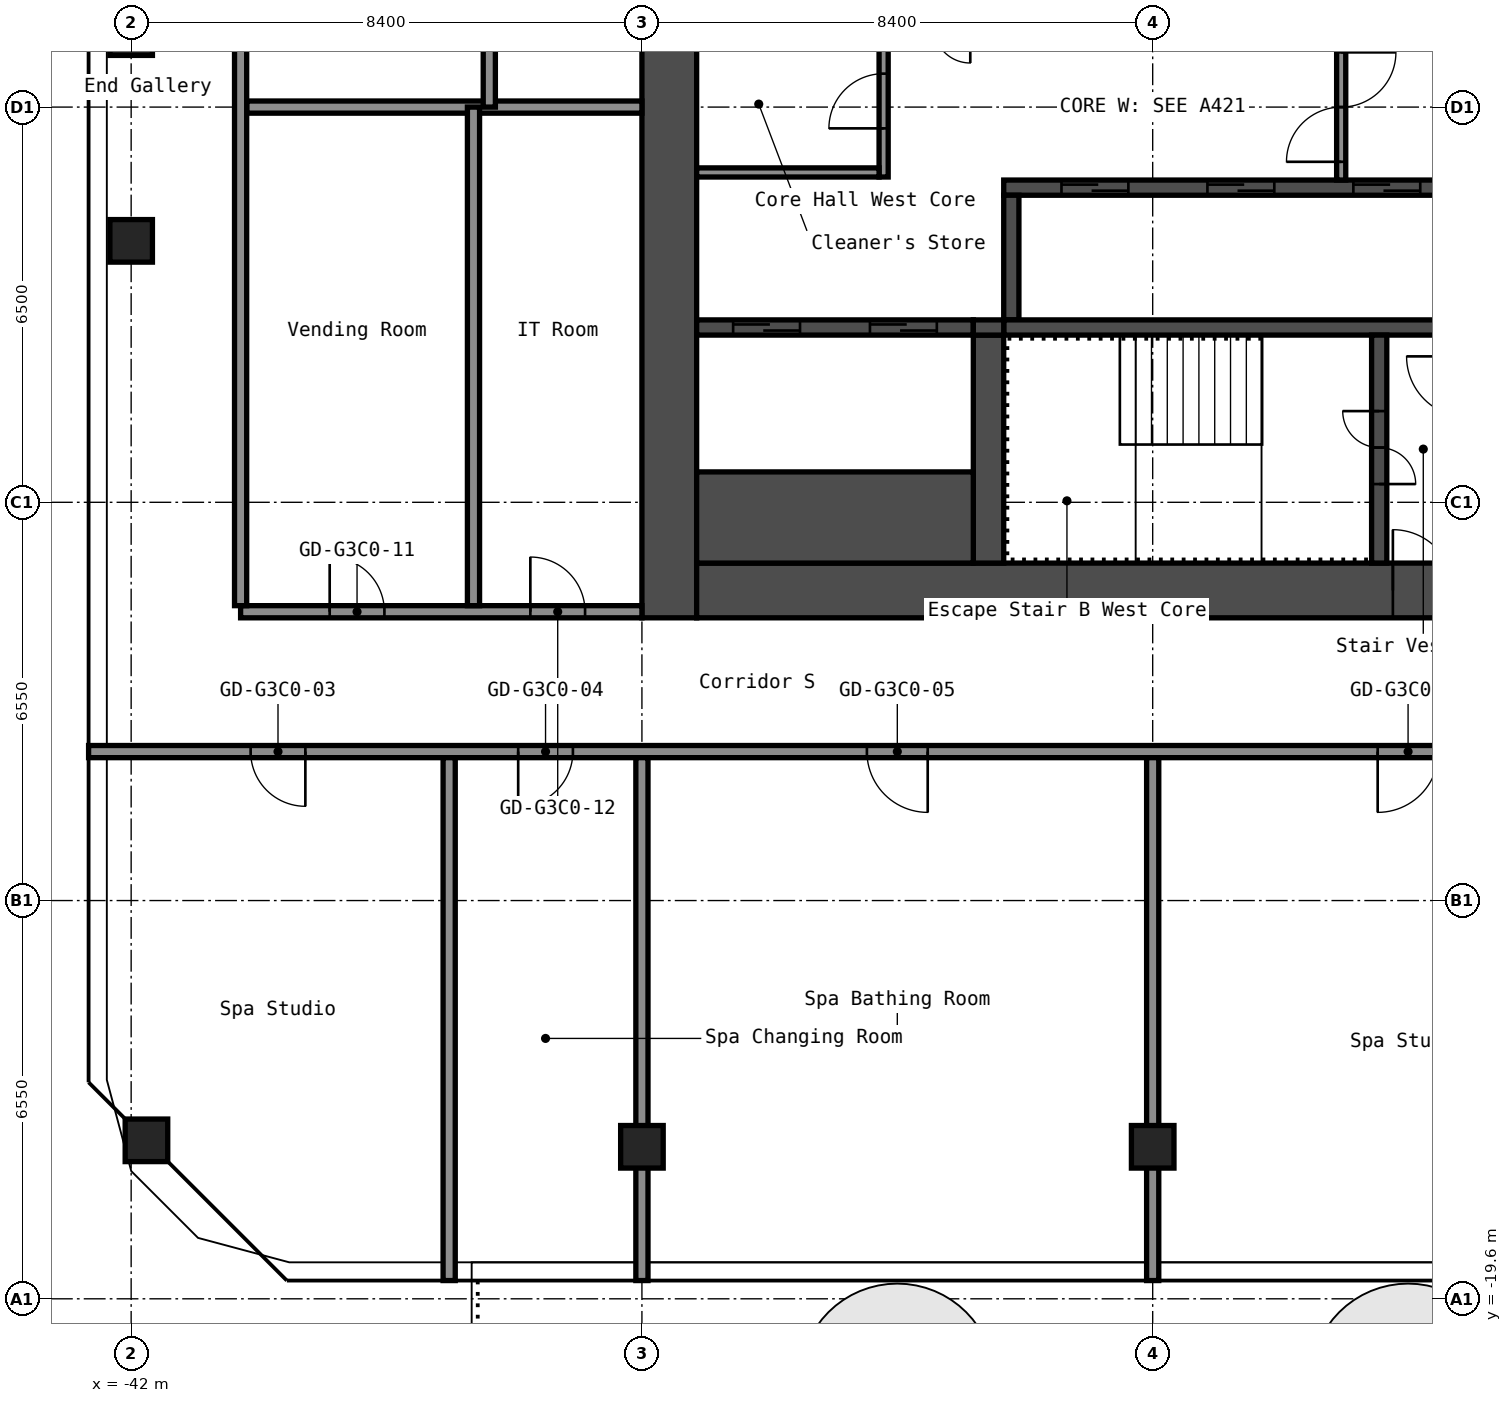
"""IFC4 building model, lengths in metres.
Left out: names, types, materials, properties, quantities, classifications, styles, units other than length and angle.
Written with IfcOpenShell. Run it as: python <this file> out.ifc"""

import sys

from ifc_helpers import new_model, si_unit, direction, frame, frame_2d, origin, origin_2d, place, context, subcontext, project, spatial, rectangle, hollow_rectangle, extrude, element, fill, save


model = new_model("IFC4")
c1 = context("Model", 3, precision=1e-05, world=origin(), true_north=direction((0.0, 1.0)))
c2 = subcontext(c1, "Body", "Model", "MODEL_VIEW")
j1 = project(units=[si_unit("LENGTHUNIT", "METRE"), si_unit("PLANEANGLEUNIT", "RADIAN")], contexts=[c1])
p1 = place(None, origin())
s1 = spatial("IfcSite", under=j1, at=p1, CompositionType="ELEMENT")
p2 = place(p1, origin())
s2 = spatial("IfcBuilding", under=s1, at=p2, CompositionType="ELEMENT")
p3 = place(p2, frame((0.0, 0.0, 137.4)))
s3 = spatial("IfcBuildingStorey", under=s2, at=p3, CompositionType="ELEMENT", Elevation=137.4)
for number, where, z_axis, x_axis in (
    (1, (-41.749, -16.994, 0.0), (0.0, 0.0, 1.0), (1.0, 0.0, 0.0)),
    (2, (-42.0, -2.2, 0.0), (0.0, 0.0, 1.0), (1.0, 0.0, 0.0)),
    (3, (-42.0, 1.2, 0.0), (0.0, 0.0, 1.0), (1.0, 0.0, 0.0)),
    (4, (-33.6, -17.1, 0.0), (0.0, 0.0, 1.0), (1.0, 0.0, 0.0)),
    (5, (-25.2, -17.1, 0.0), (0.0, 0.0, 1.0), (1.0, 0.0, 0.0)),
):
    element("IfcColumn", number, at=place(p3, frame(where, z_axis=z_axis, x_axis=x_axis)), inside=s3, PredefinedType="COLUMN", context=c2, shape_type="SweptSolid", body=[
        extrude(hollow_rectangle(XDim=0.7, YDim=0.7, WallThickness=0.028, at=origin_2d()), origin(), (0.0, 0.0, 1.0), 2.75),
    ])
p4 = place(p3, frame((-33.15, -8.4, 0.0), z_axis=(0.0, 0.0, 1.0), x_axis=(0.0, 1.0, 0.0)))
e6 = element("IfcWall", 6, at=p4, inside=s3, PredefinedType="SHEAR", context=c2, shape_type="SweptSolid", body=[
    extrude(rectangle(XDim=16.8, YDim=0.9, at=frame_2d((8.4, 0.0))), origin(), (0.0, 0.0, 1.0), 2.75),
])
p5 = place(p3, frame((-32.7, -7.95, 0.0), z_axis=(0.0, 0.0, 1.0), x_axis=(1.0, 0.0, 0.0)))
e7 = element("IfcWall", 7, at=p5, inside=s3, PredefinedType="SHEAR", context=c2, shape_type="SweptSolid", body=[
    extrude(rectangle(XDim=15.0, YDim=0.9, at=frame_2d((7.5, 0.0))), origin(), (0.0, 0.0, 1.0), 2.75),
])
p6 = place(p5, frame((11.45, 0.0, 0.0)))
e8 = element("IfcOpeningElement", 8, at=p6, cuts=e7, PredefinedType="OPENING", context=c2, shape_type="SweptSolid", body=[
    extrude(rectangle(XDim=1.0, YDim=2.1, at=frame_2d((0.5, 1.05))), frame((0.0, 0.46, 0.0), z_axis=(0.0, -1.0, 0.0), x_axis=(1.0, 0.0, 0.0)), (0.0, 0.0, 1.0), 0.92),
])
p7 = place(p3, frame((-27.65, -1.325, 0.0), z_axis=(0.0, 0.0, 1.0), x_axis=(1.0, 0.0, 0.0)))
e9 = element("IfcWall", 9, at=p7, inside=s3, PredefinedType="SHEAR", context=c2, shape_type="SweptSolid", body=[
    extrude(rectangle(XDim=7.5, YDim=0.25, at=frame_2d((3.75, 0.0))), origin(), (0.0, 0.0, 1.0), 2.75),
])
p8 = place(p7, frame((5.75, 0.0, 0.0)))
e10 = element("IfcOpeningElement", 10, at=p8, cuts=e9, PredefinedType="OPENING", context=c2, shape_type="SweptSolid", body=[
    extrude(rectangle(XDim=1.1, YDim=2.1, at=frame_2d((0.55, 1.05))), frame((0.0, 0.135, 0.0), z_axis=(0.0, -1.0, 0.0), x_axis=(1.0, 0.0, 0.0)), (0.0, 0.0, 1.0), 0.27),
])
p9 = place(p7, frame((3.35, 0.0, 0.0)))
e11 = element("IfcOpeningElement", 11, at=p9, cuts=e9, PredefinedType="OPENING", context=c2, shape_type="SweptSolid", body=[
    extrude(rectangle(XDim=1.1, YDim=2.1, at=frame_2d((0.55, 1.05))), frame((0.0, 0.135, 0.0), z_axis=(0.0, -1.0, 0.0), x_axis=(1.0, 0.0, 0.0)), (0.0, 0.0, 1.0), 0.27),
])
p10 = place(p7, frame((0.95, 0.0, 0.0)))
e12 = element("IfcOpeningElement", 12, at=p10, cuts=e9, PredefinedType="OPENING", context=c2, shape_type="SweptSolid", body=[
    extrude(rectangle(XDim=1.1, YDim=2.1, at=frame_2d((0.55, 1.05))), frame((0.0, 0.135, 0.0), z_axis=(0.0, -1.0, 0.0), x_axis=(1.0, 0.0, 0.0)), (0.0, 0.0, 1.0), 0.27),
])
p11 = place(p3, frame((-27.525, -3.5, 0.0), z_axis=(0.0, 0.0, 1.0), x_axis=(0.0, 1.0, 0.0)))
e13 = element("IfcWall", 13, at=p11, inside=s3, PredefinedType="SHEAR", context=c2, shape_type="SweptSolid", body=[
    extrude(rectangle(XDim=2.05, YDim=0.25, at=frame_2d((1.025, 0.0))), origin(), (0.0, 0.0, 1.0), 2.75),
])
p12 = place(p3, frame((-27.65, -3.625, 0.0), z_axis=(0.0, 0.0, 1.0), x_axis=(1.0, 0.0, 0.0)))
e14 = element("IfcWall", 14, at=p12, inside=s3, PredefinedType="SHEAR", context=c2, shape_type="SweptSolid", body=[
    extrude(rectangle(XDim=7.5, YDim=0.25, at=frame_2d((3.75, 0.0))), origin(), (0.0, 0.0, 1.0), 2.75),
])
p13 = place(p3, frame((-21.475, -7.5, 0.0), z_axis=(0.0, 0.0, 1.0), x_axis=(0.0, 1.0, 0.0)))
e15 = element("IfcWall", 15, at=p13, inside=s3, PredefinedType="SHEAR", context=c2, shape_type="SweptSolid", body=[
    extrude(rectangle(XDim=3.75, YDim=0.25, at=frame_2d((1.875, 0.0))), origin(), (0.0, 0.0, 1.0), 2.75),
])
p14 = place(p13, frame((1.3, 0.0, 0.0)))
e16 = element("IfcOpeningElement", 16, at=p14, cuts=e15, PredefinedType="OPENING", context=c2, shape_type="SweptSolid", body=[
    extrude(rectangle(XDim=1.2, YDim=2.1, at=frame_2d((0.6, 1.05))), frame((0.0, 0.135, 0.0), z_axis=(0.0, -1.0, 0.0), x_axis=(1.0, 0.0, 0.0)), (0.0, 0.0, 1.0), 0.27),
])
p15 = place(p3, frame((-27.9, -7.5, 0.0), z_axis=(0.0, 0.0, 1.0), x_axis=(0.0, 1.0, 0.0)))
e17 = element("IfcWall", 17, at=p15, inside=s3, PredefinedType="SHEAR", context=c2, shape_type="SweptSolid", body=[
    extrude(rectangle(XDim=3.75, YDim=0.5, at=frame_2d((1.875, 0.0))), origin(), (0.0, 0.0, 1.0), 2.75),
])
p16 = place(p3, frame((-32.7, -3.625, 0.0), z_axis=(0.0, 0.0, 1.0), x_axis=(1.0, 0.0, 0.0)))
e18 = element("IfcWall", 18, at=p16, inside=s3, PredefinedType="SHEAR", context=c2, shape_type="SweptSolid", body=[
    extrude(rectangle(XDim=4.55, YDim=0.25, at=frame_2d((2.275, 0.0))), origin(), (0.0, 0.0, 1.0), 2.75),
])
p17 = place(p16, frame((2.85, 0.0, 0.0)))
e19 = element("IfcOpeningElement", 19, at=p17, cuts=e18, PredefinedType="OPENING", context=c2, shape_type="SweptSolid", body=[
    extrude(rectangle(XDim=1.1, YDim=2.1, at=frame_2d((0.55, 1.05))), frame((0.0, 0.135, 0.0), z_axis=(0.0, -1.0, 0.0), x_axis=(1.0, 0.0, 0.0)), (0.0, 0.0, 1.0), 0.27),
])
p18 = place(p16, frame((0.6, 0.0, 0.0)))
e20 = element("IfcOpeningElement", 20, at=p18, cuts=e18, PredefinedType="OPENING", context=c2, shape_type="SweptSolid", body=[
    extrude(rectangle(XDim=1.1, YDim=2.1, at=frame_2d((0.55, 1.05))), frame((0.0, 0.135, 0.0), z_axis=(0.0, -1.0, 0.0), x_axis=(1.0, 0.0, 0.0)), (0.0, 0.0, 1.0), 0.27),
])
p19 = place(p3, frame((-32.7, -6.75, 0.0), z_axis=(0.0, 0.0, 1.0), x_axis=(1.0, 0.0, 0.0)))
e21 = element("IfcWall", 21, at=p19, inside=s3, PredefinedType="SHEAR", context=c2, shape_type="SweptSolid", body=[
    extrude(rectangle(XDim=4.55, YDim=1.5, at=frame_2d((2.275, 0.0))), origin(), (0.0, 0.0, 1.0), 2.75),
])
p20 = place(p3, frame((-28.15, -3.625, 0.0), z_axis=(0.0, 0.0, 1.0), x_axis=(1.0, 0.0, 0.0)))
e22 = element("IfcWall", 22, at=p20, inside=s3, PredefinedType="SHEAR", context=c2, shape_type="SweptSolid", body=[
    extrude(rectangle(XDim=0.5, YDim=0.25, at=frame_2d((0.25, 0.0))), origin(), (0.0, 0.0, 1.0), 2.75),
])
p21 = place(p3, frame((-22.1, -1.2, 0.0), z_axis=(0.0, 0.0, 1.0), x_axis=(0.0, 1.0, 0.0)))
e23 = element("IfcWall", 23, at=p21, inside=s3, PredefinedType="PARTITIONING", context=c2, shape_type="SweptSolid", body=[
    extrude(rectangle(XDim=2.4, YDim=0.15, at=frame_2d((1.2, 0.0))), origin(), (0.0, 0.0, 1.0), 2.75),
])
p22 = place(p21, frame((0.3, 0.0, 0.0)))
e24 = element("IfcOpeningElement", 24, at=p22, cuts=e23, PredefinedType="OPENING", context=c2, shape_type="SweptSolid", body=[
    extrude(rectangle(XDim=1.8, YDim=2.1, at=frame_2d((0.9, 1.05))), frame((0.0, 0.085, 0.0), z_axis=(0.0, -1.0, 0.0), x_axis=(1.0, 0.0, 0.0)), (0.0, 0.0, 1.0), 0.17),
])
p23 = place(p3, frame((-29.625, -1.15, 0.0), z_axis=(0.0, 0.0, 1.0), x_axis=(0.0, 1.0, 0.0)))
e25 = element("IfcWall", 25, at=p23, inside=s3, PredefinedType="PARTITIONING", context=c2, shape_type="SweptSolid", body=[
    extrude(rectangle(XDim=2.35, YDim=0.15, at=frame_2d((1.175, 0.0))), origin(), (0.0, 0.0, 1.0), 2.75),
])
p24 = place(p23, frame((0.8, 0.0, 0.0)))
e26 = element("IfcOpeningElement", 26, at=p24, cuts=e25, PredefinedType="OPENING", context=c2, shape_type="SweptSolid", body=[
    extrude(rectangle(XDim=0.9, YDim=2.1, at=frame_2d((0.45, 1.05))), frame((0.0, 0.085, 0.0), z_axis=(0.0, -1.0, 0.0), x_axis=(1.0, 0.0, 0.0)), (0.0, 0.0, 1.0), 0.17),
])
p25 = place(p3, frame((-32.7, -1.075, 0.0), z_axis=(0.0, 0.0, 1.0), x_axis=(1.0, 0.0, 0.0)))
e27 = element("IfcWall", 27, at=p25, inside=s3, PredefinedType="PARTITIONING", context=c2, shape_type="SweptSolid", body=[
    extrude(rectangle(XDim=3.0, YDim=0.15, at=frame_2d((1.5, 0.0))), origin(), (0.0, 0.0, 1.0), 2.75),
])
p26 = place(p3, frame((-42.7, -10.6, 0.0), z_axis=(0.0, 0.0, 1.0), x_axis=(1.0, 0.0, 0.0)))
e28 = element("IfcWall", 28, at=p26, inside=s3, PredefinedType="PARTITIONING", context=c2, shape_type="SweptSolid", body=[
    extrude(rectangle(XDim=25.9, YDim=0.2, at=frame_2d((12.95, 0.0))), origin(), (0.0, 0.0, 1.0), 2.75),
])
p27 = place(p26, frame((2.665, 0.0, 0.0)))
e29 = element("IfcOpeningElement", 29, at=p27, cuts=e28, PredefinedType="OPENING", context=c2, shape_type="SweptSolid", body=[
    extrude(rectangle(XDim=0.9, YDim=2.1, at=frame_2d((0.45, 1.05))), frame((0.0, 0.11, 0.0), z_axis=(0.0, -1.0, 0.0), x_axis=(1.0, 0.0, 0.0)), (0.0, 0.0, 1.0), 0.22),
])
p28 = place(p26, frame((7.065, 0.0, 0.0)))
e30 = element("IfcOpeningElement", 30, at=p28, cuts=e28, PredefinedType="OPENING", context=c2, shape_type="SweptSolid", body=[
    extrude(rectangle(XDim=0.9, YDim=2.1, at=frame_2d((0.45, 1.05))), frame((0.0, 0.11, 0.0), z_axis=(0.0, -1.0, 0.0), x_axis=(1.0, 0.0, 0.0)), (0.0, 0.0, 1.0), 0.22),
])
p29 = place(p26, frame((12.8, 0.0, 0.0)))
e31 = element("IfcOpeningElement", 31, at=p29, cuts=e28, PredefinedType="OPENING", context=c2, shape_type="SweptSolid", body=[
    extrude(rectangle(XDim=1.0, YDim=2.1, at=frame_2d((0.5, 1.05))), frame((0.0, 0.11, 0.0), z_axis=(0.0, -1.0, 0.0), x_axis=(1.0, 0.0, 0.0)), (0.0, 0.0, 1.0), 0.22),
])
p30 = place(p26, frame((21.2, 0.0, 0.0)))
e32 = element("IfcOpeningElement", 32, at=p30, cuts=e28, PredefinedType="OPENING", context=c2, shape_type="SweptSolid", body=[
    extrude(rectangle(XDim=1.0, YDim=2.1, at=frame_2d((0.5, 1.05))), frame((0.0, 0.11, 0.0), z_axis=(0.0, -1.0, 0.0), x_axis=(1.0, 0.0, 0.0)), (0.0, 0.0, 1.0), 0.22),
])
p31 = place(p3, frame((-40.2, -8.3, 0.0), z_axis=(0.0, 0.0, 1.0), x_axis=(1.0, 0.0, 0.0)))
e33 = element("IfcWall", 33, at=p31, inside=s3, PredefinedType="PARTITIONING", context=c2, shape_type="SweptSolid", body=[
    extrude(rectangle(XDim=6.6, YDim=0.2, at=frame_2d((3.3, 0.0))), origin(), (0.0, 0.0, 1.0), 2.75),
])
p32 = place(p31, frame((1.465, 0.0, 0.0)))
e34 = element("IfcOpeningElement", 34, at=p32, cuts=e33, PredefinedType="OPENING", context=c2, shape_type="SweptSolid", body=[
    extrude(rectangle(XDim=0.9, YDim=2.1, at=frame_2d((0.45, 1.05))), frame((0.0, 0.11, 0.0), z_axis=(0.0, -1.0, 0.0), x_axis=(1.0, 0.0, 0.0)), (0.0, 0.0, 1.0), 0.22),
])
p33 = place(p31, frame((4.765, 0.0, 0.0)))
e35 = element("IfcOpeningElement", 35, at=p33, cuts=e33, PredefinedType="OPENING", context=c2, shape_type="SweptSolid", body=[
    extrude(rectangle(XDim=0.9, YDim=2.1, at=frame_2d((0.45, 1.05))), frame((0.0, 0.11, 0.0), z_axis=(0.0, -1.0, 0.0), x_axis=(1.0, 0.0, 0.0)), (0.0, 0.0, 1.0), 0.22),
])
p34 = place(p3, frame((-40.1, 0.0, 0.0), z_axis=(0.0, 0.0, 1.0), x_axis=(1.0, 0.0, 0.0)))
e36 = element("IfcWall", 36, at=p34, inside=s3, PredefinedType="PARTITIONING", context=c2, shape_type="SweptSolid", body=[
    extrude(rectangle(XDim=6.5, YDim=0.2, at=frame_2d((3.25, 0.0))), origin(), (0.0, 0.0, 1.0), 2.75),
])
p35 = place(p3, frame((-40.2, -8.2, 0.0), z_axis=(0.0, 0.0, 1.0), x_axis=(0.0, 1.0, 0.0)))
e37 = element("IfcWall", 37, at=p35, inside=s3, PredefinedType="PARTITIONING", context=c2, shape_type="SweptSolid", body=[
    extrude(rectangle(XDim=16.4, YDim=0.2, at=frame_2d((8.2, 0.0))), origin(), (0.0, 0.0, 1.0), 2.75),
])
p36 = place(p3, frame((-36.77, -19.3, 0.0), z_axis=(0.0, 0.0, 1.0), x_axis=(0.0, 1.0, 0.0)))
e38 = element("IfcWall", 38, at=p36, inside=s3, PredefinedType="PARTITIONING", context=c2, shape_type="SweptSolid", body=[
    extrude(rectangle(XDim=8.6, YDim=0.2, at=frame_2d((4.3, 0.0))), origin(), (0.0, 0.0, 1.0), 2.75),
])
for number, where, z_axis, x_axis in (
    (39, (-36.37, -8.2, 0.0), (0.0, 0.0, 1.0), (0.0, 1.0, 0.0)),
    (40, (-36.11, 0.0, 0.0), (0.0, 0.0, 1.0), (0.0, 1.0, 0.0)),
):
    element("IfcWall", number, at=place(p3, frame(where, z_axis=z_axis, x_axis=x_axis)), inside=s3, PredefinedType="PARTITIONING", context=c2, shape_type="SweptSolid", body=[
        extrude(rectangle(XDim=8.2, YDim=0.2, at=frame_2d((4.1, 0.0))), origin(), (0.0, 0.0, 1.0), 2.75),
    ])
for number, where, z_axis, x_axis in (
    (41, (-33.6, -19.3, 0.0), (0.0, 0.0, 1.0), (0.0, 1.0, 0.0)),
    (42, (-25.2, -19.3, 0.0), (0.0, 0.0, 1.0), (0.0, 1.0, 0.0)),
):
    element("IfcWall", number, at=place(p3, frame(where, z_axis=z_axis, x_axis=x_axis)), inside=s3, PredefinedType="PARTITIONING", context=c2, shape_type="SweptSolid", body=[
        extrude(rectangle(XDim=8.6, YDim=0.2, at=frame_2d((4.3, 0.0))), origin(), (0.0, 0.0, 1.0), 2.75),
    ])
p37 = place(p6, origin())
e43 = element("IfcDoor", 43, at=p37, inside=s3, OperationType="SINGLE_SWING_RIGHT", PredefinedType="DOOR", context=c2, shape_type="SweptSolid", body=[
    extrude(rectangle(XDim=1.0, YDim=2.1, at=frame_2d((0.5, 1.05))), frame((0.0, 0.025, 0.0), z_axis=(0.0, -1.0, 0.0), x_axis=(1.0, 0.0, 0.0)), (0.0, 0.0, 1.0), 0.05),
])
fill(e8, e43)
p38 = place(p14, origin())
e44 = element("IfcDoor", 44, at=p38, inside=s3, OperationType="DOUBLE_DOOR_SINGLE_SWING", PredefinedType="DOOR", context=c2, shape_type="SweptSolid", body=[
    extrude(rectangle(XDim=1.2, YDim=2.1, at=frame_2d((0.6, 1.05))), frame((0.0, 0.025, 0.0), z_axis=(0.0, -1.0, 0.0), x_axis=(1.0, 0.0, 0.0)), (0.0, 0.0, 1.0), 0.05),
])
fill(e16, e44)
p39 = place(p22, origin())
e45 = element("IfcDoor", 45, at=p39, inside=s3, OperationType="DOUBLE_DOOR_SINGLE_SWING", PredefinedType="DOOR", context=c2, shape_type="SweptSolid", body=[
    extrude(rectangle(XDim=1.8, YDim=2.1, at=frame_2d((0.9, 1.05))), frame((0.0, 0.025, 0.0), z_axis=(0.0, -1.0, 0.0), x_axis=(1.0, 0.0, 0.0)), (0.0, 0.0, 1.0), 0.05),
])
fill(e24, e45)
p40 = place(p24, origin())
e46 = element("IfcDoor", 46, at=p40, inside=s3, OperationType="SINGLE_SWING_RIGHT", PredefinedType="DOOR", context=c2, shape_type="SweptSolid", body=[
    extrude(rectangle(XDim=0.9, YDim=2.1, at=frame_2d((0.45, 1.05))), frame((0.0, 0.025, 0.0), z_axis=(0.0, -1.0, 0.0), x_axis=(1.0, 0.0, 0.0)), (0.0, 0.0, 1.0), 0.05),
])
fill(e26, e46)
p41 = place(p8, origin())
e47 = element("IfcDoor", 47, at=p41, inside=s3, OperationType="DOUBLE_DOOR_SLIDING", PredefinedType="DOOR", context=c2, shape_type="SweptSolid", body=[
    extrude(rectangle(XDim=1.1, YDim=2.1, at=frame_2d((0.55, 1.05))), frame((0.0, 0.025, 0.0), z_axis=(0.0, -1.0, 0.0), x_axis=(1.0, 0.0, 0.0)), (0.0, 0.0, 1.0), 0.05),
])
fill(e10, e47)
p42 = place(p9, origin())
e48 = element("IfcDoor", 48, at=p42, inside=s3, OperationType="DOUBLE_DOOR_SLIDING", PredefinedType="DOOR", context=c2, shape_type="SweptSolid", body=[
    extrude(rectangle(XDim=1.1, YDim=2.1, at=frame_2d((0.55, 1.05))), frame((0.0, 0.025, 0.0), z_axis=(0.0, -1.0, 0.0), x_axis=(1.0, 0.0, 0.0)), (0.0, 0.0, 1.0), 0.05),
])
fill(e11, e48)
p43 = place(p10, origin())
e49 = element("IfcDoor", 49, at=p43, inside=s3, OperationType="DOUBLE_DOOR_SLIDING", PredefinedType="DOOR", context=c2, shape_type="SweptSolid", body=[
    extrude(rectangle(XDim=1.1, YDim=2.1, at=frame_2d((0.55, 1.05))), frame((0.0, 0.025, 0.0), z_axis=(0.0, -1.0, 0.0), x_axis=(1.0, 0.0, 0.0)), (0.0, 0.0, 1.0), 0.05),
])
fill(e12, e49)
p44 = place(p17, origin())
e50 = element("IfcDoor", 50, at=p44, inside=s3, OperationType="DOUBLE_DOOR_SLIDING", PredefinedType="DOOR", context=c2, shape_type="SweptSolid", body=[
    extrude(rectangle(XDim=1.1, YDim=2.1, at=frame_2d((0.55, 1.05))), frame((0.0, 0.025, 0.0), z_axis=(0.0, -1.0, 0.0), x_axis=(1.0, 0.0, 0.0)), (0.0, 0.0, 1.0), 0.05),
])
fill(e19, e50)
p45 = place(p18, origin())
e51 = element("IfcDoor", 51, at=p45, inside=s3, OperationType="DOUBLE_DOOR_SLIDING", PredefinedType="DOOR", context=c2, shape_type="SweptSolid", body=[
    extrude(rectangle(XDim=1.1, YDim=2.1, at=frame_2d((0.55, 1.05))), frame((0.0, 0.025, 0.0), z_axis=(0.0, -1.0, 0.0), x_axis=(1.0, 0.0, 0.0)), (0.0, 0.0, 1.0), 0.05),
])
fill(e20, e51)
p46 = place(p27, origin())
e52 = element("IfcDoor", 52, at=p46, inside=s3, OperationType="SINGLE_SWING_RIGHT", PredefinedType="DOOR", context=c2, shape_type="SweptSolid", body=[
    extrude(rectangle(XDim=0.9, YDim=2.1, at=frame_2d((0.45, 1.05))), frame((0.0, 0.025, 0.0), z_axis=(0.0, -1.0, 0.0), x_axis=(1.0, 0.0, 0.0)), (0.0, 0.0, 1.0), 0.05),
])
fill(e29, e52)
p47 = place(p28, origin())
e53 = element("IfcDoor", 53, at=p47, inside=s3, OperationType="SINGLE_SWING_LEFT", PredefinedType="DOOR", context=c2, shape_type="SweptSolid", body=[
    extrude(rectangle(XDim=0.9, YDim=2.1, at=frame_2d((0.45, 1.05))), frame((0.0, 0.025, 0.0), z_axis=(0.0, -1.0, 0.0), x_axis=(1.0, 0.0, 0.0)), (0.0, 0.0, 1.0), 0.05),
])
fill(e30, e53)
p48 = place(p29, origin())
e54 = element("IfcDoor", 54, at=p48, inside=s3, OperationType="SINGLE_SWING_RIGHT", PredefinedType="DOOR", context=c2, shape_type="SweptSolid", body=[
    extrude(rectangle(XDim=1.0, YDim=2.1, at=frame_2d((0.5, 1.05))), frame((0.0, 0.025, 0.0), z_axis=(0.0, -1.0, 0.0), x_axis=(1.0, 0.0, 0.0)), (0.0, 0.0, 1.0), 0.05),
])
fill(e31, e54)
p49 = place(p30, origin())
e55 = element("IfcDoor", 55, at=p49, inside=s3, OperationType="SINGLE_SWING_LEFT", PredefinedType="DOOR", context=c2, shape_type="SweptSolid", body=[
    extrude(rectangle(XDim=1.0, YDim=2.1, at=frame_2d((0.5, 1.05))), frame((0.0, 0.025, 0.0), z_axis=(0.0, -1.0, 0.0), x_axis=(1.0, 0.0, 0.0)), (0.0, 0.0, 1.0), 0.05),
])
fill(e32, e55)
p50 = place(p32, origin())
e56 = element("IfcDoor", 56, at=p50, inside=s3, OperationType="SINGLE_SWING_RIGHT", PredefinedType="DOOR", context=c2, shape_type="SweptSolid", body=[
    extrude(rectangle(XDim=0.9, YDim=2.1, at=frame_2d((0.45, 1.05))), frame((0.0, 0.025, 0.0), z_axis=(0.0, -1.0, 0.0), x_axis=(1.0, 0.0, 0.0)), (0.0, 0.0, 1.0), 0.05),
])
fill(e34, e56)
p51 = place(p33, origin())
e57 = element("IfcDoor", 57, at=p51, inside=s3, OperationType="SINGLE_SWING_RIGHT", PredefinedType="DOOR", context=c2, shape_type="SweptSolid", body=[
    extrude(rectangle(XDim=0.9, YDim=2.1, at=frame_2d((0.45, 1.05))), frame((0.0, 0.025, 0.0), z_axis=(0.0, -1.0, 0.0), x_axis=(1.0, 0.0, 0.0)), (0.0, 0.0, 1.0), 0.05),
])
fill(e35, e57)
save(model, sys.argv[1])
